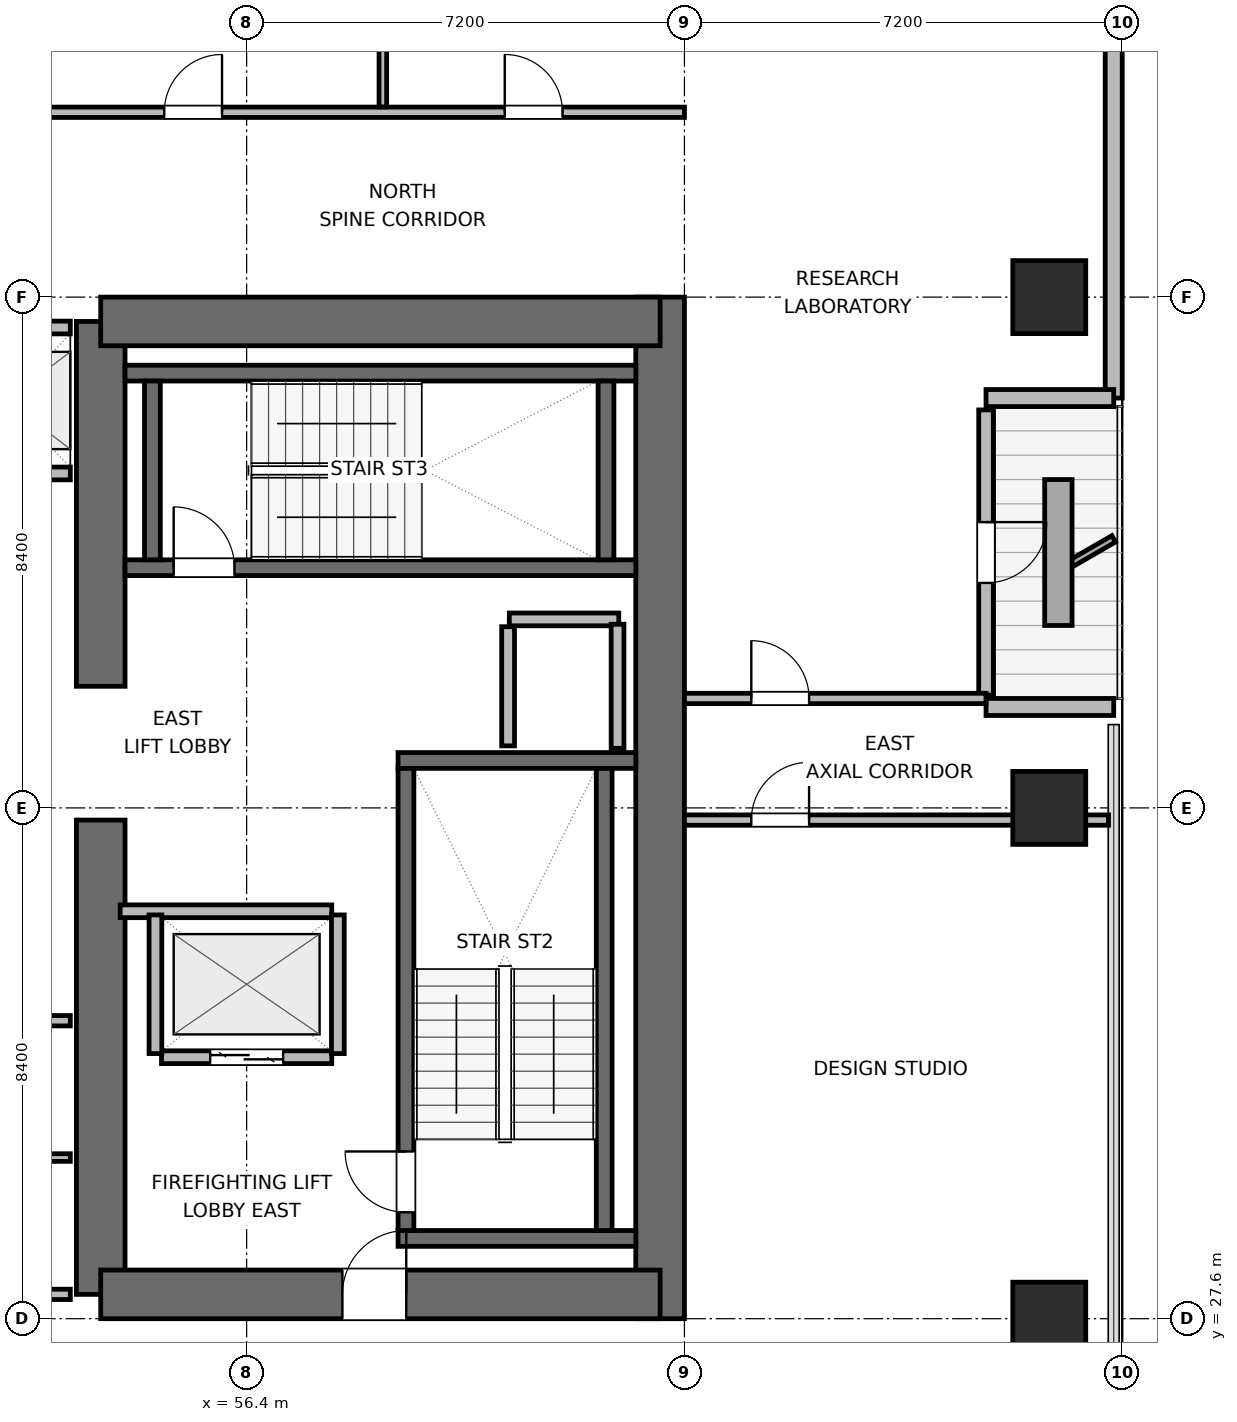
"""IFC4 building model, lengths in metres.
Left out: names, types, materials, properties, quantities, classifications, styles, units other than length and angle.
Written with IfcOpenShell. Run it as: python <this file> out.ifc"""

import sys

from ifc_helpers import new_model, si_unit, direction, frame, frame_2d, origin, origin_2d, place, context, subcontext, project, spatial, rectangle, extrude, element, fill, save


model = new_model("IFC4")
c1 = context("Model", 3, precision=1e-05, world=origin(), true_north=direction((0.0, 1.0)))
c2 = subcontext(c1, "Body", "Model", "MODEL_VIEW")
j1 = project(units=[si_unit("LENGTHUNIT", "METRE"), si_unit("PLANEANGLEUNIT", "RADIAN")], contexts=[c1])
p1 = place(None, origin())
s1 = spatial("IfcSite", under=j1, at=p1, CompositionType="ELEMENT")
p2 = place(p1, origin())
s2 = spatial("IfcBuilding", under=s1, at=p2, CompositionType="ELEMENT")
p3 = place(p2, frame((0.0, 0.0, 177.9)))
s3 = spatial("IfcBuildingStorey", under=s2, at=p3, CompositionType="ELEMENT", Elevation=177.9)
p4 = place(p3, frame((54.0, 28.0, 0.0), z_axis=(0.0, 0.0, 1.0), x_axis=(0.0, 1.0, 0.0)))
e1 = element("IfcWall", 1, at=p4, inside=s3, PredefinedType="SHEAR", context=c2, shape_type="SweptSolid", body=[
    extrude(rectangle(XDim=7.8, YDim=0.8, at=frame_2d((3.9, 0.0))), origin(), (0.0, 0.0, 1.0), 3.9),
])
p5 = place(p3, frame((54.0, 38.0, 0.0), z_axis=(0.0, 0.0, 1.0), x_axis=(0.0, 1.0, 0.0)))
e2 = element("IfcWall", 2, at=p5, inside=s3, PredefinedType="SHEAR", context=c2, shape_type="SweptSolid", body=[
    extrude(rectangle(XDim=6.0, YDim=0.8, at=frame_2d((3.0, 0.0))), origin(), (0.0, 0.0, 1.0), 3.9),
])
p6 = place(p3, frame((63.2, 27.6, 0.0), z_axis=(0.0, 0.0, 1.0), x_axis=(0.0, 1.0, 0.0)))
e3 = element("IfcWall", 3, at=p6, inside=s3, PredefinedType="SHEAR", context=c2, shape_type="SweptSolid", body=[
    extrude(rectangle(XDim=16.8, YDim=0.8, at=frame_2d((8.4, 0.0))), origin(), (0.0, 0.0, 1.0), 3.9),
])
p7 = place(p3, frame((54.0, 28.0, 0.0), z_axis=(0.0, 0.0, 1.0), x_axis=(1.0, 0.0, 0.0)))
e4 = element("IfcWall", 4, at=p7, inside=s3, PredefinedType="SHEAR", context=c2, shape_type="SweptSolid", body=[
    extrude(rectangle(XDim=9.2, YDim=0.8, at=frame_2d((4.6, 0.0))), origin(), (0.0, 0.0, 1.0), 3.9),
])
p8 = place(p7, frame((3.975, 0.0, 0.0)))
e5 = element("IfcOpeningElement", 5, at=p8, cuts=e4, PredefinedType="OPENING", context=c2, shape_type="SweptSolid", body=[
    extrude(rectangle(XDim=1.05, YDim=2.04, at=frame_2d((0.525, 1.02))), frame((0.0, 0.41, 0.0), z_axis=(0.0, -1.0, 0.0), x_axis=(1.0, 0.0, 0.0)), (0.0, 0.0, 1.0), 0.82),
])
p9 = place(p3, frame((54.0, 44.0, 0.0), z_axis=(0.0, 0.0, 1.0), x_axis=(1.0, 0.0, 0.0)))
e6 = element("IfcWall", 6, at=p9, inside=s3, PredefinedType="SHEAR", context=c2, shape_type="SweptSolid", body=[
    extrude(rectangle(XDim=9.2, YDim=0.8, at=frame_2d((4.6, 0.0))), origin(), (0.0, 0.0, 1.0), 3.9),
])
for number, where, z_axis, x_axis in (
    (7, (58.89, 28.92, 0.0), (0.0, 0.0, 1.0), (1.0, 0.0, 0.0)),
    (8, (58.89, 36.78, 0.0), (0.0, 0.0, 1.0), (1.0, 0.0, 0.0)),
):
    element("IfcWall", number, at=place(p3, frame(where, z_axis=z_axis, x_axis=x_axis)), inside=s3, PredefinedType="SHEAR", context=c2, shape_type="SweptSolid", body=[
        extrude(rectangle(XDim=3.91, YDim=0.26, at=frame_2d((1.955, 0.0))), origin(), (0.0, 0.0, 1.0), 3.9),
    ])
p10 = place(p3, frame((59.02, 29.05, 0.0), z_axis=(0.0, 0.0, 1.0), x_axis=(0.0, 1.0, 0.0)))
e9 = element("IfcWall", 9, at=p10, inside=s3, PredefinedType="SHEAR", context=c2, shape_type="SweptSolid", body=[
    extrude(rectangle(XDim=7.6, YDim=0.26, at=frame_2d((3.8, 0.0))), origin(), (0.0, 0.0, 1.0), 3.9),
])
p11 = place(p10, frame((0.3, 0.0, 0.0)))
e10 = element("IfcOpeningElement", 10, at=p11, cuts=e9, PredefinedType="OPENING", context=c2, shape_type="SweptSolid", body=[
    extrude(rectangle(XDim=1.0, YDim=2.04, at=frame_2d((0.5, 1.02))), frame((0.0, 0.14, 0.0), z_axis=(0.0, -1.0, 0.0), x_axis=(1.0, 0.0, 0.0)), (0.0, 0.0, 1.0), 0.28),
])
p12 = place(p3, frame((62.28, 29.05, 0.0), z_axis=(0.0, 0.0, 1.0), x_axis=(0.0, 1.0, 0.0)))
e11 = element("IfcWall", 11, at=p12, inside=s3, PredefinedType="SHEAR", context=c2, shape_type="SweptSolid", body=[
    extrude(rectangle(XDim=7.6, YDim=0.26, at=frame_2d((3.8, 0.0))), origin(), (0.0, 0.0, 1.0), 3.9),
])
p13 = place(p3, frame((54.4, 39.95, 0.0), z_axis=(0.0, 0.0, 1.0), x_axis=(1.0, 0.0, 0.0)))
e12 = element("IfcWall", 12, at=p13, inside=s3, PredefinedType="SHEAR", context=c2, shape_type="SweptSolid", body=[
    extrude(rectangle(XDim=8.4, YDim=0.26, at=frame_2d((4.2, 0.0))), origin(), (0.0, 0.0, 1.0), 3.9),
])
p14 = place(p13, frame((0.8, 0.0, 0.0)))
e13 = element("IfcOpeningElement", 13, at=p14, cuts=e12, PredefinedType="OPENING", context=c2, shape_type="SweptSolid", body=[
    extrude(rectangle(XDim=1.0, YDim=2.04, at=frame_2d((0.5, 1.02))), frame((0.0, 0.14, 0.0), z_axis=(0.0, -1.0, 0.0), x_axis=(1.0, 0.0, 0.0)), (0.0, 0.0, 1.0), 0.28),
])
p15 = place(p3, frame((54.4, 43.15, 0.0), z_axis=(0.0, 0.0, 1.0), x_axis=(1.0, 0.0, 0.0)))
e14 = element("IfcWall", 14, at=p15, inside=s3, PredefinedType="SHEAR", context=c2, shape_type="SweptSolid", body=[
    extrude(rectangle(XDim=8.4, YDim=0.26, at=frame_2d((4.2, 0.0))), origin(), (0.0, 0.0, 1.0), 3.9),
])
for number, where, z_axis, x_axis in (
    (15, (54.85, 40.08, 0.0), (0.0, 0.0, 1.0), (0.0, 1.0, 0.0)),
    (16, (62.31, 40.08, 0.0), (0.0, 0.0, 1.0), (0.0, 1.0, 0.0)),
):
    element("IfcWall", number, at=place(p3, frame(where, z_axis=z_axis, x_axis=x_axis)), inside=s3, PredefinedType="SHEAR", context=c2, shape_type="SweptSolid", body=[
        extrude(rectangle(XDim=2.94, YDim=0.26, at=frame_2d((1.47, 0.0))), origin(), (0.0, 0.0, 1.0), 3.9),
    ])
for number, where, z_axis, x_axis in (
    (17, (69.6, 27.6, 0.0), (0.0, 0.0, 1.0), (1.0, 0.0, 0.0)),
    (18, (69.6, 36.0, 0.0), (0.0, 0.0, 1.0), (1.0, 0.0, 0.0)),
    (19, (69.6, 44.4, 0.0), (0.0, 0.0, 1.0), (1.0, 0.0, 0.0)),
):
    element("IfcColumn", number, at=place(p3, frame(where, z_axis=z_axis, x_axis=x_axis)), inside=s3, PredefinedType="COLUMN", context=c2, shape_type="SweptSolid", body=[
        extrude(rectangle(XDim=1.2, YDim=1.2, at=origin_2d()), origin(), (0.0, 0.0, 1.0), 3.9),
    ])
p16 = place(p3, frame((70.66, 56.982, 0.0), z_axis=(0.0, 0.0, 1.0), x_axis=(0.0, -1.0, 0.0)))
e20 = element("IfcWall", 20, at=p16, inside=s3, PredefinedType="SOLIDWALL", context=c2, shape_type="SweptSolid", body=[
    extrude(rectangle(XDim=14.242, YDim=0.28, at=frame_2d((7.121, 0.0))), origin(), (0.0, 0.0, 1.0), 3.68),
])
p17 = place(p3, frame((70.66, 42.74, 0.0), z_axis=(0.0, 0.0, 1.0), x_axis=(-1.0, 0.0, 0.0)))
e21 = element("IfcWall", 21, at=p17, inside=s3, PredefinedType="SOLIDWALL", context=c2, shape_type="SweptSolid", body=[
    extrude(rectangle(XDim=2.1, YDim=0.28, at=frame_2d((1.05, 0.0))), origin(), (0.0, 0.0, 1.0), 3.116),
])
p18 = place(p3, frame((68.56, 42.545, 0.0), z_axis=(0.0, 0.0, 1.0), x_axis=(0.0, -1.0, 0.0)))
e22 = element("IfcWall", 22, at=p18, inside=s3, PredefinedType="SOLIDWALL", context=c2, shape_type="SweptSolid", body=[
    extrude(rectangle(XDim=4.69, YDim=0.24, at=frame_2d((2.345, 0.0))), origin(), (0.0, 0.0, 1.0), 3.248),
])
p19 = place(p18, frame((1.845, 0.0, 0.0)))
e23 = element("IfcOpeningElement", 23, at=p19, cuts=e22, PredefinedType="OPENING", context=c2, shape_type="SweptSolid", body=[
    extrude(rectangle(XDim=1.0, YDim=2.02, at=frame_2d((0.5, 1.01))), frame((0.0, 0.13, 0.0), z_axis=(0.0, -1.0, 0.0), x_axis=(1.0, 0.0, 0.0)), (0.0, 0.0, 1.0), 0.26),
])
p20 = place(p3, frame((68.56, 37.66, 0.0), z_axis=(0.0, 0.0, 1.0), x_axis=(1.0, 0.0, 0.0)))
e24 = element("IfcWall", 24, at=p20, inside=s3, PredefinedType="SOLIDWALL", context=c2, shape_type="SweptSolid", body=[
    extrude(rectangle(XDim=2.1, YDim=0.28, at=frame_2d((1.05, 0.0))), origin(), (0.0, 0.0, 1.0), 3.116),
])
p21 = place(p3, frame((60.72, 39.1, 0.0), z_axis=(0.0, 0.0, 1.0), x_axis=(1.0, 0.0, 0.0)))
e25 = element("IfcWall", 25, at=p21, inside=s3, PredefinedType="PARTITIONING", context=c2, shape_type="SweptSolid", body=[
    extrude(rectangle(XDim=1.8, YDim=0.21, at=frame_2d((0.9, 0.0))), origin(), (0.0, 0.0, 1.0), 3.68),
])
p22 = place(p3, frame((60.7, 37.02, 0.0), z_axis=(0.0, 0.0, 1.0), x_axis=(0.0, 1.0, 0.0)))
e26 = element("IfcWall", 26, at=p22, inside=s3, PredefinedType="PARTITIONING", context=c2, shape_type="SweptSolid", body=[
    extrude(rectangle(XDim=1.96, YDim=0.21, at=frame_2d((0.98, 0.0))), origin(), (0.0, 0.0, 1.0), 3.68),
])
p23 = place(p3, frame((62.5, 36.98, 0.0), z_axis=(0.0, 0.0, 1.0), x_axis=(0.0, 1.0, 0.0)))
e27 = element("IfcWall", 27, at=p23, inside=s3, PredefinedType="PARTITIONING", context=c2, shape_type="SweptSolid", body=[
    extrude(rectangle(XDim=2.04, YDim=0.21, at=frame_2d((1.02, 0.0))), origin(), (0.0, 0.0, 1.0), 3.68),
])
p24 = place(p3, frame((55.0, 31.9, 0.0), z_axis=(0.0, 0.0, 1.0), x_axis=(1.0, 0.0, 0.0)))
e28 = element("IfcWall", 28, at=p24, inside=s3, PredefinedType="PARTITIONING", context=c2, shape_type="SweptSolid", body=[
    extrude(rectangle(XDim=2.8, YDim=0.21, at=frame_2d((1.4, 0.0))), origin(), (0.0, 0.0, 1.0), 3.68),
])
p25 = place(p24, frame((0.8, 0.0, 0.0)))
e29 = element("IfcOpeningElement", 29, at=p25, cuts=e28, PredefinedType="OPENING", context=c2, shape_type="SweptSolid", body=[
    extrude(rectangle(XDim=1.2, YDim=2.04, at=frame_2d((0.6, 1.02))), frame((0.0, 0.115, 0.0), z_axis=(0.0, -1.0, 0.0), x_axis=(1.0, 0.0, 0.0)), (0.0, 0.0, 1.0), 0.23),
])
p26 = place(p3, frame((54.32, 34.3, 0.0), z_axis=(0.0, 0.0, 1.0), x_axis=(1.0, 0.0, 0.0)))
e30 = element("IfcWall", 30, at=p26, inside=s3, PredefinedType="PARTITIONING", context=c2, shape_type="SweptSolid", body=[
    extrude(rectangle(XDim=3.48, YDim=0.21, at=frame_2d((1.74, 0.0))), origin(), (0.0, 0.0, 1.0), 3.68),
])
for number, where, z_axis, x_axis in (
    (31, (54.9, 31.96, 0.0), (0.0, 0.0, 1.0), (0.0, 1.0, 0.0)),
    (32, (57.9, 31.96, 0.0), (0.0, 0.0, 1.0), (0.0, 1.0, 0.0)),
):
    element("IfcWall", number, at=place(p3, frame(where, z_axis=z_axis, x_axis=x_axis)), inside=s3, PredefinedType="PARTITIONING", context=c2, shape_type="SweptSolid", body=[
        extrude(rectangle(XDim=2.28, YDim=0.21, at=frame_2d((1.14, 0.0))), origin(), (0.0, 0.0, 1.0), 3.68),
    ])
p27 = place(p3, frame((51.4, 41.5, 0.0), z_axis=(0.0, 0.0, 1.0), x_axis=(1.0, 0.0, 0.0)))
e33 = element("IfcWall", 33, at=p27, inside=s3, PredefinedType="PARTITIONING", context=c2, shape_type="SweptSolid", body=[
    extrude(rectangle(XDim=2.1, YDim=0.21, at=frame_2d((1.05, 0.0))), origin(), (0.0, 0.0, 1.0), 3.68),
])
p28 = place(p27, frame((0.5, 0.0, 0.0)))
e34 = element("IfcOpeningElement", 34, at=p28, cuts=e33, PredefinedType="OPENING", context=c2, shape_type="SweptSolid", body=[
    extrude(rectangle(XDim=1.1, YDim=2.04, at=frame_2d((0.55, 1.02))), frame((0.0, 0.115, 0.0), z_axis=(0.0, -1.0, 0.0), x_axis=(1.0, 0.0, 0.0)), (0.0, 0.0, 1.0), 0.23),
])
p29 = place(p3, frame((51.4, 43.9, 0.0), z_axis=(0.0, 0.0, 1.0), x_axis=(1.0, 0.0, 0.0)))
e35 = element("IfcWall", 35, at=p29, inside=s3, PredefinedType="PARTITIONING", context=c2, shape_type="SweptSolid", body=[
    extrude(rectangle(XDim=2.1, YDim=0.21, at=frame_2d((1.05, 0.0))), origin(), (0.0, 0.0, 1.0), 2.765),
])
p30 = place(p3, frame((49.287, 28.0, 0.0), z_axis=(0.0, 0.0, 1.0), x_axis=(1.0, 0.0, 0.0)))
e36 = element("IfcWall", 36, at=p30, inside=s3, PredefinedType="PARTITIONING", context=c2, shape_type="SweptSolid", body=[
    extrude(rectangle(XDim=4.213, YDim=0.17, at=frame_2d((2.106, 0.0))), origin(), (0.0, 0.0, 1.0), 2.765),
])
p31 = place(p3, frame((52.2, 32.5, 0.0), z_axis=(0.0, 0.0, 1.0), x_axis=(1.0, 0.0, 0.0)))
e37 = element("IfcWall", 37, at=p31, inside=s3, PredefinedType="PARTITIONING", context=c2, shape_type="SweptSolid", body=[
    extrude(rectangle(XDim=1.3, YDim=0.17, at=frame_2d((0.65, 0.0))), origin(), (0.0, 0.0, 1.0), 3.68),
])
p32 = place(p3, frame((49.287, 30.25, 0.0), z_axis=(0.0, 0.0, 1.0), x_axis=(1.0, 0.0, 0.0)))
e38 = element("IfcWall", 38, at=p32, inside=s3, PredefinedType="PARTITIONING", context=c2, shape_type="SweptSolid", body=[
    extrude(rectangle(XDim=4.213, YDim=0.125, at=frame_2d((2.106, 0.0))), origin(), (0.0, 0.0, 1.0), 3.68),
])
p33 = place(p3, frame((29.525, 47.44, 0.0), z_axis=(0.0, 0.0, 1.0), x_axis=(1.0, 0.0, 0.0)))
e39 = element("IfcWall", 39, at=p33, inside=s3, PredefinedType="PARTITIONING", context=c2, shape_type="SweptSolid", body=[
    extrude(rectangle(XDim=34.075, YDim=0.17, at=frame_2d((17.038, 0.0))), origin(), (0.0, 0.0, 1.0), 3.68),
])
p34 = place(p33, frame((1.217, 0.0, 0.0)))
e40 = element("IfcOpeningElement", 40, at=p34, cuts=e39, PredefinedType="OPENING", context=c2, shape_type="SweptSolid", body=[
    extrude(rectangle(XDim=0.95, YDim=2.04, at=frame_2d((0.475, 1.02))), frame((0.0, 0.095, 0.0), z_axis=(0.0, -1.0, 0.0), x_axis=(1.0, 0.0, 0.0)), (0.0, 0.0, 1.0), 0.19),
])
p35 = place(p33, frame((6.37, 0.0, 0.0)))
e41 = element("IfcOpeningElement", 41, at=p35, cuts=e39, PredefinedType="OPENING", context=c2, shape_type="SweptSolid", body=[
    extrude(rectangle(XDim=0.95, YDim=2.04, at=frame_2d((0.475, 1.02))), frame((0.0, 0.095, 0.0), z_axis=(0.0, -1.0, 0.0), x_axis=(1.0, 0.0, 0.0)), (0.0, 0.0, 1.0), 0.19),
])
p36 = place(p33, frame((12.01, 0.0, 0.0)))
e42 = element("IfcOpeningElement", 42, at=p36, cuts=e39, PredefinedType="OPENING", context=c2, shape_type="SweptSolid", body=[
    extrude(rectangle(XDim=0.95, YDim=2.04, at=frame_2d((0.475, 1.02))), frame((0.0, 0.095, 0.0), z_axis=(0.0, -1.0, 0.0), x_axis=(1.0, 0.0, 0.0)), (0.0, 0.0, 1.0), 0.19),
])
p37 = place(p33, frame((16.86, 0.0, 0.0)))
e43 = element("IfcOpeningElement", 43, at=p37, cuts=e39, PredefinedType="OPENING", context=c2, shape_type="SweptSolid", body=[
    extrude(rectangle(XDim=0.95, YDim=2.04, at=frame_2d((0.475, 1.02))), frame((0.0, 0.095, 0.0), z_axis=(0.0, -1.0, 0.0), x_axis=(1.0, 0.0, 0.0)), (0.0, 0.0, 1.0), 0.19),
])
p38 = place(p33, frame((20.965, 0.0, 0.0)))
e44 = element("IfcOpeningElement", 44, at=p38, cuts=e39, PredefinedType="OPENING", context=c2, shape_type="SweptSolid", body=[
    extrude(rectangle(XDim=0.95, YDim=2.04, at=frame_2d((0.475, 1.02))), frame((0.0, 0.095, 0.0), z_axis=(0.0, -1.0, 0.0), x_axis=(1.0, 0.0, 0.0)), (0.0, 0.0, 1.0), 0.19),
])
p39 = place(p33, frame((25.52, 0.0, 0.0)))
e45 = element("IfcOpeningElement", 45, at=p39, cuts=e39, PredefinedType="OPENING", context=c2, shape_type="SweptSolid", body=[
    extrude(rectangle(XDim=0.95, YDim=2.04, at=frame_2d((0.475, 1.02))), frame((0.0, 0.095, 0.0), z_axis=(0.0, -1.0, 0.0), x_axis=(1.0, 0.0, 0.0)), (0.0, 0.0, 1.0), 0.19),
])
p40 = place(p33, frame((31.12, 0.0, 0.0)))
e46 = element("IfcOpeningElement", 46, at=p40, cuts=e39, PredefinedType="OPENING", context=c2, shape_type="SweptSolid", body=[
    extrude(rectangle(XDim=0.95, YDim=2.04, at=frame_2d((0.475, 1.02))), frame((0.0, 0.095, 0.0), z_axis=(0.0, -1.0, 0.0), x_axis=(1.0, 0.0, 0.0)), (0.0, 0.0, 1.0), 0.19),
])
p41 = place(p3, frame((58.64, 47.527, 0.0), z_axis=(0.0, 0.0, 1.0), x_axis=(0.0, 1.0, 0.0)))
e47 = element("IfcWall", 47, at=p41, inside=s3, PredefinedType="PARTITIONING", context=c2, shape_type="SweptSolid", body=[
    extrude(rectangle(XDim=14.598, YDim=0.125, at=frame_2d((7.299, 0.0))), origin(), (0.0, 0.0, 1.0), 3.68),
])
p42 = place(p3, frame((63.6, 35.8, 0.0), z_axis=(0.0, 0.0, 1.0), x_axis=(1.0, 0.0, 0.0)))
e48 = element("IfcWall", 48, at=p42, inside=s3, PredefinedType="PARTITIONING", context=c2, shape_type="SweptSolid", body=[
    extrude(rectangle(XDim=6.975, YDim=0.17, at=frame_2d((3.487, 0.0))), origin(), (0.0, 0.0, 1.0), 3.043),
])
p43 = place(p42, frame((1.1, 0.0, 0.0)))
e49 = element("IfcOpeningElement", 49, at=p43, cuts=e48, PredefinedType="OPENING", context=c2, shape_type="SweptSolid", body=[
    extrude(rectangle(XDim=0.95, YDim=2.04, at=frame_2d((0.475, 1.02))), frame((0.0, 0.095, 0.0), z_axis=(0.0, -1.0, 0.0), x_axis=(1.0, 0.0, 0.0)), (0.0, 0.0, 1.0), 0.19),
])
p44 = place(p3, frame((63.6, 37.8, 0.0), z_axis=(0.0, 0.0, 1.0), x_axis=(1.0, 0.0, 0.0)))
e50 = element("IfcWall", 50, at=p44, inside=s3, PredefinedType="PARTITIONING", context=c2, shape_type="SweptSolid", body=[
    extrude(rectangle(XDim=4.96, YDim=0.17, at=frame_2d((2.48, 0.0))), origin(), (0.0, 0.0, 1.0), 3.68),
])
p45 = place(p44, frame((1.1, 0.0, 0.0)))
e51 = element("IfcOpeningElement", 51, at=p45, cuts=e50, PredefinedType="OPENING", context=c2, shape_type="SweptSolid", body=[
    extrude(rectangle(XDim=0.95, YDim=2.04, at=frame_2d((0.475, 1.02))), frame((0.0, 0.095, 0.0), z_axis=(0.0, -1.0, 0.0), x_axis=(1.0, 0.0, 0.0)), (0.0, 0.0, 1.0), 0.19),
])
p46 = place(p19, origin())
e52 = element("IfcDoor", 52, at=p46, inside=s3, OperationType="SINGLE_SWING_LEFT", PredefinedType="DOOR", context=c2, shape_type="SweptSolid", body=[
    extrude(rectangle(XDim=1.0, YDim=2.02, at=frame_2d((0.5, 1.01))), frame((0.0, 0.025, 0.0), z_axis=(0.0, -1.0, 0.0), x_axis=(1.0, 0.0, 0.0)), (0.0, 0.0, 1.0), 0.05),
])
fill(e23, e52)
p47 = place(p11, origin())
e53 = element("IfcDoor", 53, at=p47, inside=s3, OperationType="SINGLE_SWING_RIGHT", PredefinedType="DOOR", context=c2, shape_type="SweptSolid", body=[
    extrude(rectangle(XDim=1.0, YDim=2.04, at=frame_2d((0.5, 1.02))), frame((0.0, 0.025, 0.0), z_axis=(0.0, -1.0, 0.0), x_axis=(1.0, 0.0, 0.0)), (0.0, 0.0, 1.0), 0.05),
])
fill(e10, e53)
p48 = place(p14, origin())
e54 = element("IfcDoor", 54, at=p48, inside=s3, OperationType="SINGLE_SWING_LEFT", PredefinedType="DOOR", context=c2, shape_type="SweptSolid", body=[
    extrude(rectangle(XDim=1.0, YDim=2.04, at=frame_2d((0.5, 1.02))), frame((0.0, 0.025, 0.0), z_axis=(0.0, -1.0, 0.0), x_axis=(1.0, 0.0, 0.0)), (0.0, 0.0, 1.0), 0.05),
])
fill(e13, e54)
p49 = place(p25, origin())
e55 = element("IfcDoor", 55, at=p49, inside=s3, OperationType="DOUBLE_DOOR_SLIDING", PredefinedType="DOOR", context=c2, shape_type="SweptSolid", body=[
    extrude(rectangle(XDim=1.2, YDim=2.04, at=frame_2d((0.6, 1.02))), frame((0.0, 0.025, 0.0), z_axis=(0.0, -1.0, 0.0), x_axis=(1.0, 0.0, 0.0)), (0.0, 0.0, 1.0), 0.05),
])
fill(e29, e55)
p50 = place(p8, origin())
e56 = element("IfcDoor", 56, at=p50, inside=s3, OperationType="SINGLE_SWING_RIGHT", PredefinedType="DOOR", context=c2, shape_type="SweptSolid", body=[
    extrude(rectangle(XDim=1.05, YDim=2.04, at=frame_2d((0.525, 1.02))), frame((0.0, 0.025, 0.0), z_axis=(0.0, -1.0, 0.0), x_axis=(1.0, 0.0, 0.0)), (0.0, 0.0, 1.0), 0.05),
])
fill(e5, e56)
p51 = place(p39, origin())
e57 = element("IfcDoor", 57, at=p51, inside=s3, OperationType="SINGLE_SWING_RIGHT", PredefinedType="DOOR", context=c2, shape_type="SweptSolid", body=[
    extrude(rectangle(XDim=0.95, YDim=2.04, at=frame_2d((0.475, 1.02))), frame((0.0, 0.025, 0.0), z_axis=(0.0, -1.0, 0.0), x_axis=(1.0, 0.0, 0.0)), (0.0, 0.0, 1.0), 0.05),
])
fill(e45, e57)
p52 = place(p40, origin())
e58 = element("IfcDoor", 58, at=p52, inside=s3, OperationType="SINGLE_SWING_LEFT", PredefinedType="DOOR", context=c2, shape_type="SweptSolid", body=[
    extrude(rectangle(XDim=0.95, YDim=2.04, at=frame_2d((0.475, 1.02))), frame((0.0, 0.025, 0.0), z_axis=(0.0, -1.0, 0.0), x_axis=(1.0, 0.0, 0.0)), (0.0, 0.0, 1.0), 0.05),
])
fill(e46, e58)
p53 = place(p43, origin())
e59 = element("IfcDoor", 59, at=p53, inside=s3, OperationType="SINGLE_SWING_RIGHT", PredefinedType="DOOR", context=c2, shape_type="SweptSolid", body=[
    extrude(rectangle(XDim=0.95, YDim=2.04, at=frame_2d((0.475, 1.02))), frame((0.0, 0.025, 0.0), z_axis=(0.0, -1.0, 0.0), x_axis=(1.0, 0.0, 0.0)), (0.0, 0.0, 1.0), 0.05),
])
fill(e49, e59)
p54 = place(p45, origin())
e60 = element("IfcDoor", 60, at=p54, inside=s3, OperationType="SINGLE_SWING_LEFT", PredefinedType="DOOR", context=c2, shape_type="SweptSolid", body=[
    extrude(rectangle(XDim=0.95, YDim=2.04, at=frame_2d((0.475, 1.02))), frame((0.0, 0.025, 0.0), z_axis=(0.0, -1.0, 0.0), x_axis=(1.0, 0.0, 0.0)), (0.0, 0.0, 1.0), 0.05),
])
fill(e51, e60)
save(model, sys.argv[1])
